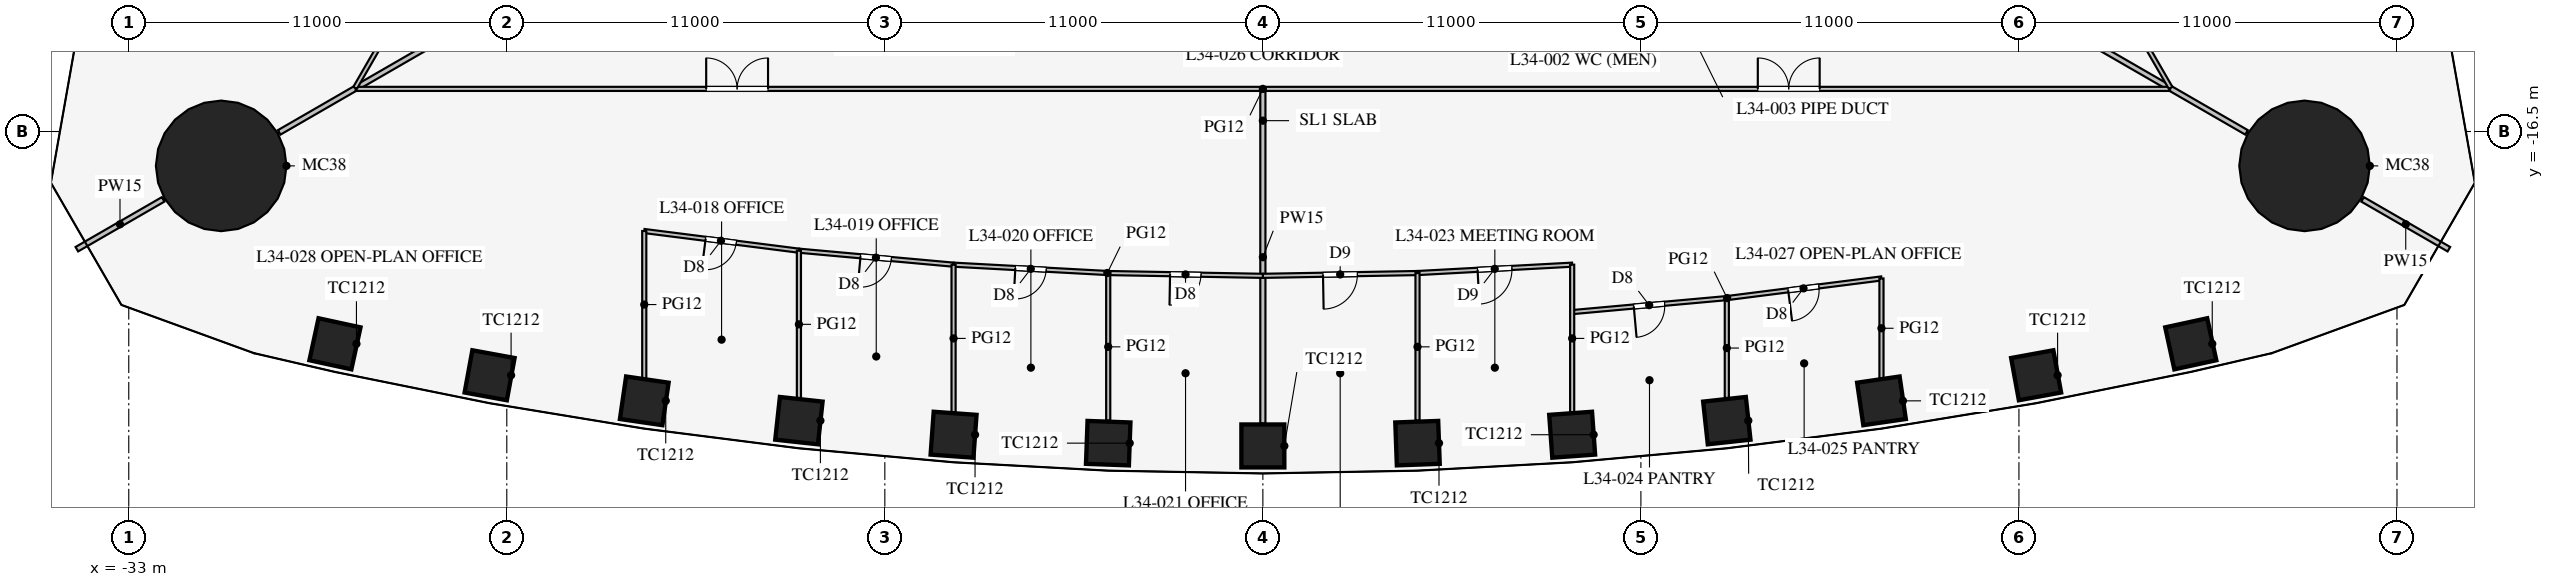
"""IFC4 building model, lengths in metres.
Left out: names, types, materials, properties, quantities, classifications, styles, units other than length and angle.
Written with IfcOpenShell. Run it as: python <this file> out.ifc"""

import sys

from ifc_helpers import new_model, si_unit, direction, frame, frame_2d, origin, origin_2d, place, context, subcontext, project, spatial, rectangle, circle, extrude, element, fill, save


model = new_model("IFC4")
c1 = context("Model", 3, precision=1e-05, world=origin(), true_north=direction((0.0, 1.0)))
c2 = subcontext(c1, "Body", "Model", "MODEL_VIEW")
j1 = project(units=[si_unit("LENGTHUNIT", "METRE"), si_unit("PLANEANGLEUNIT", "RADIAN")], contexts=[c1])
p1 = place(None, origin())
s1 = spatial("IfcSite", under=j1, at=p1, CompositionType="ELEMENT")
p2 = place(p1, origin())
s2 = spatial("IfcBuilding", under=s1, at=p2, CompositionType="ELEMENT")
p3 = place(p2, frame((0.0, 0.0, 149.3)))
s3 = spatial("IfcBuildingStorey", under=s2, at=p3, CompositionType="ELEMENT", Elevation=149.3)
for number, where, z_axis, x_axis in (
    (1, (-27.0, -22.677, 0.0), (0.0, 0.0, 1.0), (0.977, -0.212, 0.0)),
    (2, (-22.5, -23.593, 0.0), (0.0, 0.0, 1.0), (0.984, -0.18, 0.0)),
    (3, (-18.0, -24.337, 0.0), (0.0, 0.0, 1.0), (0.99, -0.144, 0.0)),
    (4, (-13.5, -24.913, 0.0), (0.0, 0.0, 1.0), (0.994, -0.108, 0.0)),
    (5, (-9.0, -25.323, 0.0), (0.0, 0.0, 1.0), (0.997, -0.072, 0.0)),
    (6, (-4.5, -25.568, 0.0), (0.0, 0.0, 1.0), (0.999, -0.036, 0.0)),
    (7, (0.0, -25.65, 0.0), (0.0, 0.0, 1.0), (1.0, 0.0, 0.0)),
    (8, (4.5, -25.568, 0.0), (0.0, 0.0, 1.0), (0.999, 0.036, 0.0)),
    (9, (9.0, -25.323, 0.0), (0.0, 0.0, 1.0), (0.997, 0.072, 0.0)),
    (10, (13.5, -24.913, 0.0), (0.0, 0.0, 1.0), (0.994, 0.108, 0.0)),
    (11, (18.0, -24.337, 0.0), (0.0, 0.0, 1.0), (0.99, 0.144, 0.0)),
    (12, (22.5, -23.593, 0.0), (0.0, 0.0, 1.0), (0.984, 0.18, 0.0)),
    (13, (27.0, -22.677, 0.0), (0.0, 0.0, 1.0), (0.977, 0.212, 0.0)),
):
    element("IfcColumn", number, at=place(p3, frame(where, z_axis=z_axis, x_axis=x_axis)), inside=s3, PredefinedType="COLUMN", context=c2, shape_type="SweptSolid", body=[
        extrude(rectangle(XDim=1.25, YDim=1.25, at=origin_2d()), origin(), (0.0, 0.0, 1.0), 4.2),
    ])
for number, where, z_axis, x_axis in (
    (14, (30.311, -17.5, 0.0), (0.0, 0.0, 1.0), (1.0, 0.0, 0.0)),
    (15, (-30.311, -17.5, 0.0), (0.0, 0.0, 1.0), (1.0, 0.0, 0.0)),
):
    element("IfcColumn", number, at=place(p3, frame(where, z_axis=z_axis, x_axis=x_axis)), inside=s3, PredefinedType="COLUMN", context=c2, shape_type="SweptSolid", body=[
        extrude(circle(Radius=1.9, at=origin_2d()), origin(), (0.0, 0.0, 1.0), 4.2),
    ])
p4 = place(p3, frame((14.203, -8.2, 0.0), z_axis=(0.0, 0.0, 1.0), x_axis=(0.866024668836, -0.500001272966, 0.0)))
e16 = element("IfcWall", 16, at=p4, inside=s3, PredefinedType="PARTITIONING", context=c2, shape_type="SweptSolid", body=[
    extrude(rectangle(XDim=16.65, YDim=0.15, at=frame_2d((8.325, 0.0))), origin(), (0.0, 0.0, 1.0), 2.3),
])
p5 = place(p3, frame((32.0, -18.475, 0.0), z_axis=(0.0, 0.0, 1.0), x_axis=(0.866042548026, -0.499970304126, 0.0)))
e17 = element("IfcWall", 17, at=p5, inside=s3, PredefinedType="PARTITIONING", context=c2, shape_type="SweptSolid", body=[
    extrude(rectangle(XDim=2.899, YDim=0.15, at=frame_2d((1.45, 0.0))), origin(), (0.0, 0.0, 1.0), 2.3),
])
p6 = place(p3, frame((-14.203, -8.2, 0.0), z_axis=(0.0, 0.0, 1.0), x_axis=(-0.866024668836, -0.500001272966, 0.0)))
e18 = element("IfcWall", 18, at=p6, inside=s3, PredefinedType="PARTITIONING", context=c2, shape_type="SweptSolid", body=[
    extrude(rectangle(XDim=16.65, YDim=0.15, at=frame_2d((8.325, 0.0))), origin(), (0.0, 0.0, 1.0), 2.3),
])
p7 = place(p3, frame((-32.0, -18.475, 0.0), z_axis=(0.0, 0.0, 1.0), x_axis=(-0.866042548026, -0.499970304126, 0.0)))
e19 = element("IfcWall", 19, at=p7, inside=s3, PredefinedType="PARTITIONING", context=c2, shape_type="SweptSolid", body=[
    extrude(rectangle(XDim=2.899, YDim=0.15, at=frame_2d((1.45, 0.0))), origin(), (0.0, 0.0, 1.0), 2.3),
])
p8 = place(p3, frame((0.0, -15.32, 0.0), z_axis=(0.0, 0.0, 1.0), x_axis=(0.0, -1.0, 0.0)))
e20 = element("IfcWall", 20, at=p8, inside=s3, PredefinedType="PARTITIONING", context=c2, shape_type="SweptSolid", body=[
    extrude(rectangle(XDim=9.675, YDim=0.15, at=frame_2d((4.837, 0.0))), origin(), (0.0, 0.0, 1.0), 3.2),
])
p9 = place(p3, frame((-26.398, -15.26, 0.0), z_axis=(0.0, 0.0, 1.0), x_axis=(1.0, 0.0, 0.0)))
e21 = element("IfcWall", 21, at=p9, inside=s3, PredefinedType="PARTITIONING", context=c2, shape_type="SweptSolid", body=[
    extrude(rectangle(XDim=52.796, YDim=0.12, at=frame_2d((26.398, 0.0))), origin(), (0.0, 0.0, 1.0), 2.9),
])
p10 = place(p9, frame((10.2, 0.0, 0.15)))
e22 = element("IfcOpeningElement", 22, at=p10, cuts=e21, PredefinedType="OPENING", context=c2, shape_type="SweptSolid", body=[
    extrude(rectangle(XDim=1.8, YDim=2.1, at=frame_2d((0.9, 1.05))), frame((0.0, 0.07, 0.0), z_axis=(0.0, -1.0, 0.0), x_axis=(1.0, 0.0, 0.0)), (0.0, 0.0, 1.0), 0.14),
])
p11 = place(p9, frame((40.8, 0.0, 0.15)))
e23 = element("IfcOpeningElement", 23, at=p11, cuts=e21, PredefinedType="OPENING", context=c2, shape_type="SweptSolid", body=[
    extrude(rectangle(XDim=1.8, YDim=2.1, at=frame_2d((0.9, 1.05))), frame((0.0, 0.07, 0.0), z_axis=(0.0, -1.0, 0.0), x_axis=(1.0, 0.0, 0.0)), (0.0, 0.0, 1.0), 0.14),
])
p12 = place(p3, frame((0.0, -20.7, 0.0), z_axis=(0.0, 0.0, 1.0), x_axis=(0.999837820638, 0.018009231578, 0.0)))
e24 = element("IfcWall", 24, at=p12, inside=s3, PredefinedType="PARTITIONING", context=c2, shape_type="SweptSolid", body=[
    extrude(rectangle(XDim=4.501, YDim=0.12, at=frame_2d((2.25, 0.0))), origin(), (0.0, 0.0, 1.0), 2.9),
])
p13 = place(p12, frame((1.75, 0.0, 0.15)))
e25 = element("IfcOpeningElement", 25, at=p13, cuts=e24, PredefinedType="OPENING", context=c2, shape_type="SweptSolid", body=[
    extrude(rectangle(XDim=1.0, YDim=2.1, at=frame_2d((0.5, 1.05))), frame((0.0, 0.07, 0.0), z_axis=(0.0, -1.0, 0.0), x_axis=(1.0, 0.0, 0.0)), (0.0, 0.0, 1.0), 0.14),
])
p14 = place(p3, frame((13.5, -21.348, 0.0), z_axis=(0.0, 0.0, 1.0), x_axis=(0.992010652594, 0.12615413247, 0.0)))
e26 = element("IfcWall", 26, at=p14, inside=s3, PredefinedType="PARTITIONING", context=c2, shape_type="SweptSolid", body=[
    extrude(rectangle(XDim=4.536, YDim=0.12, at=frame_2d((2.268, 0.0))), origin(), (0.0, 0.0, 1.0), 2.9),
])
p15 = place(p14, frame((1.8, 0.0, 0.15)))
e27 = element("IfcOpeningElement", 27, at=p15, cuts=e26, PredefinedType="OPENING", context=c2, shape_type="SweptSolid", body=[
    extrude(rectangle(XDim=0.9, YDim=2.1, at=frame_2d((0.45, 1.05))), frame((0.0, 0.07, 0.0), z_axis=(0.0, -1.0, 0.0), x_axis=(1.0, 0.0, 0.0)), (0.0, 0.0, 1.0), 0.14),
])
p16 = place(p3, frame((4.5, -20.619, 0.0), z_axis=(0.0, 0.0, 1.0), x_axis=(0.998537376538, 0.054065771581, 0.0)))
e28 = element("IfcWall", 28, at=p16, inside=s3, PredefinedType="PARTITIONING", context=c2, shape_type="SweptSolid", body=[
    extrude(rectangle(XDim=4.507, YDim=0.12, at=frame_2d((2.253, 0.0))), origin(), (0.0, 0.0, 1.0), 2.9),
])
p17 = place(p16, frame((1.75, 0.0, 0.15)))
e29 = element("IfcOpeningElement", 29, at=p17, cuts=e28, PredefinedType="OPENING", context=c2, shape_type="SweptSolid", body=[
    extrude(rectangle(XDim=1.0, YDim=2.1, at=frame_2d((0.5, 1.05))), frame((0.0, 0.07, 0.0), z_axis=(0.0, -1.0, 0.0), x_axis=(1.0, 0.0, 0.0)), (0.0, 0.0, 1.0), 0.14),
])
p18 = place(p3, frame((9.0, -21.755, 0.0), z_axis=(0.0, 0.0, 1.0), x_axis=(0.995935173755, 0.090072913121, 0.0)))
e30 = element("IfcWall", 30, at=p18, inside=s3, PredefinedType="PARTITIONING", context=c2, shape_type="SweptSolid", body=[
    extrude(rectangle(XDim=4.518, YDim=0.12, at=frame_2d((2.259, 0.0))), origin(), (0.0, 0.0, 1.0), 2.9),
])
p19 = place(p18, frame((1.8, 0.0, 0.15)))
e31 = element("IfcOpeningElement", 31, at=p19, cuts=e30, PredefinedType="OPENING", context=c2, shape_type="SweptSolid", body=[
    extrude(rectangle(XDim=0.9, YDim=2.1, at=frame_2d((0.45, 1.05))), frame((0.0, 0.07, 0.0), z_axis=(0.0, -1.0, 0.0), x_axis=(1.0, 0.0, 0.0)), (0.0, 0.0, 1.0), 0.14),
])
p20 = place(p3, frame((-13.5, -19.968, 0.0), z_axis=(0.0, 0.0, 1.0), x_axis=(0.995930325215, -0.090126507295, 0.0)))
e32 = element("IfcWall", 32, at=p20, inside=s3, PredefinedType="PARTITIONING", context=c2, shape_type="SweptSolid", body=[
    extrude(rectangle(XDim=4.518, YDim=0.12, at=frame_2d((2.259, 0.0))), origin(), (0.0, 0.0, 1.0), 2.9),
])
p21 = place(p20, frame((1.8, 0.0, 0.15)))
e33 = element("IfcOpeningElement", 33, at=p21, cuts=e32, PredefinedType="OPENING", context=c2, shape_type="SweptSolid", body=[
    extrude(rectangle(XDim=0.9, YDim=2.1, at=frame_2d((0.45, 1.05))), frame((0.0, 0.07, 0.0), z_axis=(0.0, -1.0, 0.0), x_axis=(1.0, 0.0, 0.0)), (0.0, 0.0, 1.0), 0.14),
])
p22 = place(p3, frame((-18.0, -19.396, 0.0), z_axis=(0.0, 0.0, 1.0), x_axis=(0.992010652594, -0.12615413247, 0.0)))
e34 = element("IfcWall", 34, at=p22, inside=s3, PredefinedType="PARTITIONING", context=c2, shape_type="SweptSolid", body=[
    extrude(rectangle(XDim=4.536, YDim=0.12, at=frame_2d((2.268, 0.0))), origin(), (0.0, 0.0, 1.0), 2.9),
])
p23 = place(p22, frame((1.8, 0.0, 0.15)))
e35 = element("IfcOpeningElement", 35, at=p23, cuts=e34, PredefinedType="OPENING", context=c2, shape_type="SweptSolid", body=[
    extrude(rectangle(XDim=0.9, YDim=2.1, at=frame_2d((0.45, 1.05))), frame((0.0, 0.07, 0.0), z_axis=(0.0, -1.0, 0.0), x_axis=(1.0, 0.0, 0.0)), (0.0, 0.0, 1.0), 0.14),
])
p24 = place(p3, frame((-4.5, -20.619, 0.0), z_axis=(0.0, 0.0, 1.0), x_axis=(0.999837820638, -0.018009231578, 0.0)))
e36 = element("IfcWall", 36, at=p24, inside=s3, PredefinedType="PARTITIONING", context=c2, shape_type="SweptSolid", body=[
    extrude(rectangle(XDim=4.501, YDim=0.12, at=frame_2d((2.25, 0.0))), origin(), (0.0, 0.0, 1.0), 2.9),
])
p25 = place(p24, frame((1.8, 0.0, 0.15)))
e37 = element("IfcOpeningElement", 37, at=p25, cuts=e36, PredefinedType="OPENING", context=c2, shape_type="SweptSolid", body=[
    extrude(rectangle(XDim=0.9, YDim=2.1, at=frame_2d((0.45, 1.05))), frame((0.0, 0.07, 0.0), z_axis=(0.0, -1.0, 0.0), x_axis=(1.0, 0.0, 0.0)), (0.0, 0.0, 1.0), 0.14),
])
p26 = place(p3, frame((-9.0, -20.375, 0.0), z_axis=(0.0, 0.0, 1.0), x_axis=(0.998537376538, -0.054065771581, 0.0)))
e38 = element("IfcWall", 38, at=p26, inside=s3, PredefinedType="PARTITIONING", context=c2, shape_type="SweptSolid", body=[
    extrude(rectangle(XDim=4.507, YDim=0.12, at=frame_2d((2.253, 0.0))), origin(), (0.0, 0.0, 1.0), 2.9),
])
p27 = place(p26, frame((1.8, 0.0, 0.15)))
e39 = element("IfcOpeningElement", 39, at=p27, cuts=e38, PredefinedType="OPENING", context=c2, shape_type="SweptSolid", body=[
    extrude(rectangle(XDim=0.9, YDim=2.1, at=frame_2d((0.45, 1.05))), frame((0.0, 0.07, 0.0), z_axis=(0.0, -1.0, 0.0), x_axis=(1.0, 0.0, 0.0)), (0.0, 0.0, 1.0), 0.14),
])
p28 = place(p3, frame((13.5, -21.348, 0.0), z_axis=(0.0, 0.0, 1.0), x_axis=(0.0, -1.0, 0.0)))
e40 = element("IfcWall", 40, at=p28, inside=s3, PredefinedType="PARTITIONING", context=c2, shape_type="SweptSolid", body=[
    extrude(rectangle(XDim=2.906, YDim=0.12, at=frame_2d((1.453, 0.0))), origin(), (0.0, 0.0, 1.0), 2.9),
])
p29 = place(p3, frame((18.0, -20.776, 0.0), z_axis=(0.0, 0.0, 1.0), x_axis=(0.0, -1.0, 0.0)))
e41 = element("IfcWall", 41, at=p29, inside=s3, PredefinedType="PARTITIONING", context=c2, shape_type="SweptSolid", body=[
    extrude(rectangle(XDim=2.9, YDim=0.12, at=frame_2d((1.45, 0.0))), origin(), (0.0, 0.0, 1.0), 2.9),
])
p30 = place(p3, frame((4.5, -20.619, 0.0), z_axis=(0.0, 0.0, 1.0), x_axis=(0.0, -1.0, 0.0)))
e42 = element("IfcWall", 42, at=p30, inside=s3, PredefinedType="PARTITIONING", context=c2, shape_type="SweptSolid", body=[
    extrude(rectangle(XDim=4.294, YDim=0.12, at=frame_2d((2.147, 0.0))), origin(), (0.0, 0.0, 1.0), 2.9),
])
p31 = place(p3, frame((9.0, -20.375, 0.0), z_axis=(0.0, 0.0, 1.0), x_axis=(0.0, -1.0, 0.0)))
e43 = element("IfcWall", 43, at=p31, inside=s3, PredefinedType="PARTITIONING", context=c2, shape_type="SweptSolid", body=[
    extrude(rectangle(XDim=4.291, YDim=0.12, at=frame_2d((2.146, 0.0))), origin(), (0.0, 0.0, 1.0), 2.9),
])
p32 = place(p3, frame((-13.5, -19.968, 0.0), z_axis=(0.0, 0.0, 1.0), x_axis=(0.0, -1.0, 0.0)))
e44 = element("IfcWall", 44, at=p32, inside=s3, PredefinedType="PARTITIONING", context=c2, shape_type="SweptSolid", body=[
    extrude(rectangle(XDim=4.287, YDim=0.12, at=frame_2d((2.143, 0.0))), origin(), (0.0, 0.0, 1.0), 2.9),
])
p33 = place(p3, frame((-18.0, -19.396, 0.0), z_axis=(0.0, 0.0, 1.0), x_axis=(0.0, -1.0, 0.0)))
e45 = element("IfcWall", 45, at=p33, inside=s3, PredefinedType="PARTITIONING", context=c2, shape_type="SweptSolid", body=[
    extrude(rectangle(XDim=4.28, YDim=0.12, at=frame_2d((2.14, 0.0))), origin(), (0.0, 0.0, 1.0), 2.9),
])
p34 = place(p3, frame((-4.5, -20.619, 0.0), z_axis=(0.0, 0.0, 1.0), x_axis=(0.0, -1.0, 0.0)))
e46 = element("IfcWall", 46, at=p34, inside=s3, PredefinedType="PARTITIONING", context=c2, shape_type="SweptSolid", body=[
    extrude(rectangle(XDim=4.294, YDim=0.12, at=frame_2d((2.147, 0.0))), origin(), (0.0, 0.0, 1.0), 2.9),
])
p35 = place(p3, frame((-9.0, -20.375, 0.0), z_axis=(0.0, 0.0, 1.0), x_axis=(0.0, -1.0, 0.0)))
e47 = element("IfcWall", 47, at=p35, inside=s3, PredefinedType="PARTITIONING", context=c2, shape_type="SweptSolid", body=[
    extrude(rectangle(XDim=4.291, YDim=0.12, at=frame_2d((2.146, 0.0))), origin(), (0.0, 0.0, 1.0), 2.9),
])
p36 = place(p3, frame((26.415, -15.231, 0.0), z_axis=(0.0, 0.0, 1.0), x_axis=(-0.50000091641, 0.866024874695, 0.0)))
e48 = element("IfcWall", 48, at=p36, inside=s3, PredefinedType="PARTITIONING", context=c2, shape_type="SweptSolid", body=[
    extrude(rectangle(XDim=52.796, YDim=0.12, at=frame_2d((26.398, 0.0))), origin(), (0.0, 0.0, 1.0), 2.9),
])
p37 = place(p36, frame((10.2, 0.0, 0.15)))
e49 = element("IfcOpeningElement", 49, at=p37, cuts=e48, PredefinedType="OPENING", context=c2, shape_type="SweptSolid", body=[
    extrude(rectangle(XDim=1.8, YDim=2.1, at=frame_2d((0.9, 1.05))), frame((0.0, 0.07, 0.0), z_axis=(0.0, -1.0, 0.0), x_axis=(1.0, 0.0, 0.0)), (0.0, 0.0, 1.0), 0.14),
])
p38 = place(p36, frame((40.8, 0.0, 0.15)))
e50 = element("IfcOpeningElement", 50, at=p38, cuts=e48, PredefinedType="OPENING", context=c2, shape_type="SweptSolid", body=[
    extrude(rectangle(XDim=1.8, YDim=2.1, at=frame_2d((0.9, 1.05))), frame((0.0, 0.07, 0.0), z_axis=(0.0, -1.0, 0.0), x_axis=(1.0, 0.0, 0.0)), (0.0, 0.0, 1.0), 0.14),
])
p39 = place(p3, frame((-0.016, 30.491, 0.0), z_axis=(0.0, 0.0, 1.0), x_axis=(-0.50000091641, -0.866024874695, 0.0)))
e51 = element("IfcWall", 51, at=p39, inside=s3, PredefinedType="PARTITIONING", context=c2, shape_type="SweptSolid", body=[
    extrude(rectangle(XDim=52.796, YDim=0.12, at=frame_2d((26.398, 0.0))), origin(), (0.0, 0.0, 1.0), 2.9),
])
p40 = place(p39, frame((10.2, 0.0, 0.15)))
e52 = element("IfcOpeningElement", 52, at=p40, cuts=e51, PredefinedType="OPENING", context=c2, shape_type="SweptSolid", body=[
    extrude(rectangle(XDim=1.8, YDim=2.1, at=frame_2d((0.9, 1.05))), frame((0.0, 0.07, 0.0), z_axis=(0.0, -1.0, 0.0), x_axis=(1.0, 0.0, 0.0)), (0.0, 0.0, 1.0), 0.14),
])
p41 = place(p39, frame((40.8, 0.0, 0.15)))
e53 = element("IfcOpeningElement", 53, at=p41, cuts=e51, PredefinedType="OPENING", context=c2, shape_type="SweptSolid", body=[
    extrude(rectangle(XDim=1.8, YDim=2.1, at=frame_2d((0.9, 1.05))), frame((0.0, 0.07, 0.0), z_axis=(0.0, -1.0, 0.0), x_axis=(1.0, 0.0, 0.0)), (0.0, 0.0, 1.0), 0.14),
])
p42 = place(p23, frame((0.9, 0.0, 0.0), z_axis=(0.0, 0.0, 1.0), x_axis=(-1.0, 0.0, 0.0)))
e54 = element("IfcDoor", 54, at=p42, inside=s3, OperationType="SINGLE_SWING_RIGHT", PredefinedType="DOOR", context=c2, shape_type="SweptSolid", body=[
    extrude(rectangle(XDim=0.9, YDim=2.1, at=frame_2d((0.45, 1.05))), frame((0.0, 0.025, 0.0), z_axis=(0.0, -1.0, 0.0), x_axis=(1.0, 0.0, 0.0)), (0.0, 0.0, 1.0), 0.05),
])
fill(e35, e54)
p43 = place(p21, frame((0.9, 0.0, 0.0), z_axis=(0.0, 0.0, 1.0), x_axis=(-1.0, 0.0, 0.0)))
e55 = element("IfcDoor", 55, at=p43, inside=s3, OperationType="SINGLE_SWING_RIGHT", PredefinedType="DOOR", context=c2, shape_type="SweptSolid", body=[
    extrude(rectangle(XDim=0.9, YDim=2.1, at=frame_2d((0.45, 1.05))), frame((0.0, 0.025, 0.0), z_axis=(0.0, -1.0, 0.0), x_axis=(1.0, 0.0, 0.0)), (0.0, 0.0, 1.0), 0.05),
])
fill(e33, e55)
p44 = place(p27, frame((0.9, 0.0, 0.0), z_axis=(0.0, 0.0, 1.0), x_axis=(-1.0, 0.0, 0.0)))
e56 = element("IfcDoor", 56, at=p44, inside=s3, OperationType="SINGLE_SWING_RIGHT", PredefinedType="DOOR", context=c2, shape_type="SweptSolid", body=[
    extrude(rectangle(XDim=0.9, YDim=2.1, at=frame_2d((0.45, 1.05))), frame((0.0, 0.025, 0.0), z_axis=(0.0, -1.0, 0.0), x_axis=(1.0, 0.0, 0.0)), (0.0, 0.0, 1.0), 0.05),
])
fill(e39, e56)
p45 = place(p25, frame((0.9, 0.0, 0.0), z_axis=(0.0, 0.0, 1.0), x_axis=(-1.0, 0.0, 0.0)))
e57 = element("IfcDoor", 57, at=p45, inside=s3, OperationType="SINGLE_SWING_RIGHT", PredefinedType="DOOR", context=c2, shape_type="SweptSolid", body=[
    extrude(rectangle(XDim=0.9, YDim=2.1, at=frame_2d((0.45, 1.05))), frame((0.0, 0.025, 0.0), z_axis=(0.0, -1.0, 0.0), x_axis=(1.0, 0.0, 0.0)), (0.0, 0.0, 1.0), 0.05),
])
fill(e37, e57)
p46 = place(p13, frame((1.0, 0.0, 0.0), z_axis=(0.0, 0.0, 1.0), x_axis=(-1.0, 0.0, 0.0)))
e58 = element("IfcDoor", 58, at=p46, inside=s3, OperationType="SINGLE_SWING_RIGHT", PredefinedType="DOOR", context=c2, shape_type="SweptSolid", body=[
    extrude(rectangle(XDim=1.0, YDim=2.1, at=frame_2d((0.5, 1.05))), frame((0.0, 0.025, 0.0), z_axis=(0.0, -1.0, 0.0), x_axis=(1.0, 0.0, 0.0)), (0.0, 0.0, 1.0), 0.05),
])
fill(e25, e58)
p47 = place(p17, frame((1.0, 0.0, 0.0), z_axis=(0.0, 0.0, 1.0), x_axis=(-1.0, 0.0, 0.0)))
e59 = element("IfcDoor", 59, at=p47, inside=s3, OperationType="SINGLE_SWING_RIGHT", PredefinedType="DOOR", context=c2, shape_type="SweptSolid", body=[
    extrude(rectangle(XDim=1.0, YDim=2.1, at=frame_2d((0.5, 1.05))), frame((0.0, 0.025, 0.0), z_axis=(0.0, -1.0, 0.0), x_axis=(1.0, 0.0, 0.0)), (0.0, 0.0, 1.0), 0.05),
])
fill(e29, e59)
p48 = place(p19, frame((0.9, 0.0, 0.0), z_axis=(0.0, 0.0, 1.0), x_axis=(-1.0, 0.0, 0.0)))
e60 = element("IfcDoor", 60, at=p48, inside=s3, OperationType="SINGLE_SWING_RIGHT", PredefinedType="DOOR", context=c2, shape_type="SweptSolid", body=[
    extrude(rectangle(XDim=0.9, YDim=2.1, at=frame_2d((0.45, 1.05))), frame((0.0, 0.025, 0.0), z_axis=(0.0, -1.0, 0.0), x_axis=(1.0, 0.0, 0.0)), (0.0, 0.0, 1.0), 0.05),
])
fill(e31, e60)
p49 = place(p15, frame((0.9, 0.0, 0.0), z_axis=(0.0, 0.0, 1.0), x_axis=(-1.0, 0.0, 0.0)))
e61 = element("IfcDoor", 61, at=p49, inside=s3, OperationType="SINGLE_SWING_RIGHT", PredefinedType="DOOR", context=c2, shape_type="SweptSolid", body=[
    extrude(rectangle(XDim=0.9, YDim=2.1, at=frame_2d((0.45, 1.05))), frame((0.0, 0.025, 0.0), z_axis=(0.0, -1.0, 0.0), x_axis=(1.0, 0.0, 0.0)), (0.0, 0.0, 1.0), 0.05),
])
fill(e27, e61)
p50 = place(p10, origin())
e62 = element("IfcDoor", 62, at=p50, inside=s3, OperationType="DOUBLE_DOOR_SINGLE_SWING", PredefinedType="DOOR", context=c2, shape_type="SweptSolid", body=[
    extrude(rectangle(XDim=1.8, YDim=2.1, at=frame_2d((0.9, 1.05))), frame((0.0, 0.025, 0.0), z_axis=(0.0, -1.0, 0.0), x_axis=(1.0, 0.0, 0.0)), (0.0, 0.0, 1.0), 0.05),
])
fill(e22, e62)
p51 = place(p11, origin())
e63 = element("IfcDoor", 63, at=p51, inside=s3, OperationType="DOUBLE_DOOR_SINGLE_SWING", PredefinedType="DOOR", context=c2, shape_type="SweptSolid", body=[
    extrude(rectangle(XDim=1.8, YDim=2.1, at=frame_2d((0.9, 1.05))), frame((0.0, 0.025, 0.0), z_axis=(0.0, -1.0, 0.0), x_axis=(1.0, 0.0, 0.0)), (0.0, 0.0, 1.0), 0.05),
])
fill(e23, e63)
save(model, sys.argv[1])
